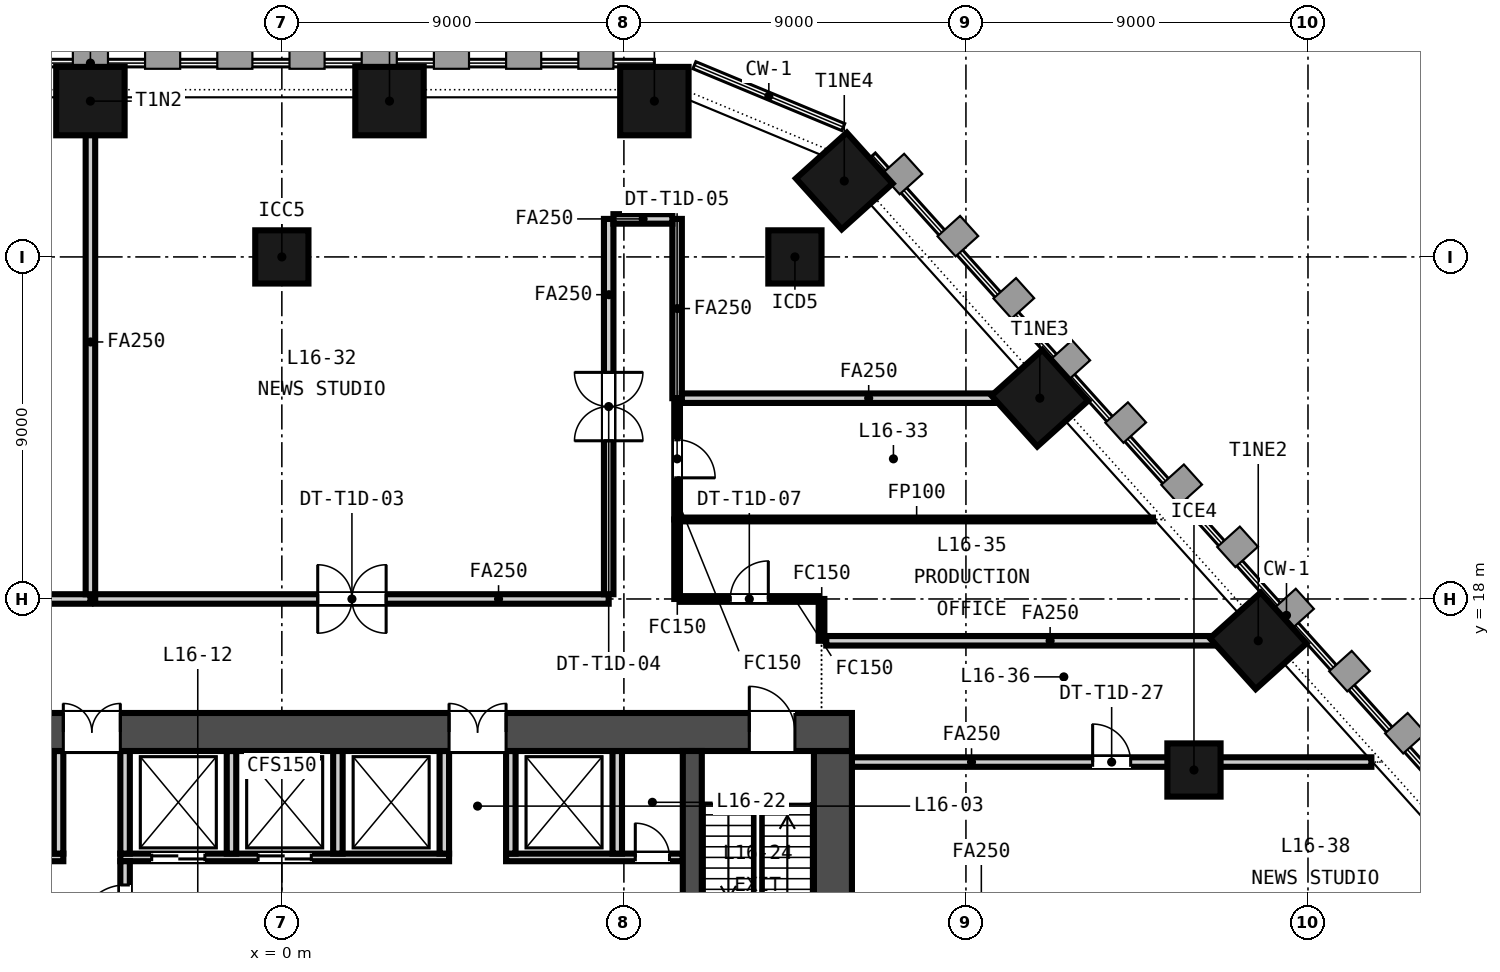
"""IFC4 building model, lengths in metres.
Left out: names, types, materials, properties, quantities, classifications, styles, units other than length and angle.
Written with IfcOpenShell. Run it as: python <this file> out.ifc"""

import sys

from ifc_helpers import new_model, si_unit, direction, frame, frame_2d, origin, origin_2d, place, context, subcontext, project, spatial, rectangle, extrude, element, fill, save


model = new_model("IFC4")
c1 = context("Model", 3, precision=1e-05, world=origin(), true_north=direction((0.0, 1.0)))
c2 = subcontext(c1, "Body", "Model", "MODEL_VIEW")
j1 = project(units=[si_unit("LENGTHUNIT", "METRE"), si_unit("PLANEANGLEUNIT", "RADIAN")], contexts=[c1])
p1 = place(None, origin())
s1 = spatial("IfcSite", under=j1, at=p1, CompositionType="ELEMENT")
p2 = place(p1, origin())
s2 = spatial("IfcBuilding", under=s1, at=p2, CompositionType="ELEMENT")
p3 = place(p2, frame((0.0, 0.0, 72.5)))
s3 = spatial("IfcBuildingStorey", under=s2, at=p3, CompositionType="ELEMENT", Elevation=72.5)
p4 = place(p3, frame((-15.0, 14.5, -0.15), z_axis=(0.0, 0.0, 1.0), x_axis=(1.0, 0.0, 0.0)))
e1 = element("IfcWall", 1, at=p4, inside=s3, PredefinedType="SOLIDWALL", context=c2, shape_type="SweptSolid", body=[
    extrude(rectangle(XDim=30.0, YDim=1.0, at=frame_2d((15.0, 0.0))), origin(), (0.0, 0.0, 1.0), 3.5),
])
p5 = place(p4, frame((9.25, 0.0, 0.15)))
e2 = element("IfcOpeningElement", 2, at=p5, cuts=e1, PredefinedType="OPENING", context=c2, shape_type="SweptSolid", body=[
    extrude(rectangle(XDim=1.5, YDim=2.1, at=frame_2d((0.75, 1.05))), frame((0.0, 0.51, 0.0), z_axis=(0.0, -1.0, 0.0), x_axis=(1.0, 0.0, 0.0)), (0.0, 0.0, 1.0), 1.02),
])
p6 = place(p4, frame((19.4, 0.0, 0.15)))
e3 = element("IfcOpeningElement", 3, at=p6, cuts=e1, PredefinedType="OPENING", context=c2, shape_type="SweptSolid", body=[
    extrude(rectangle(XDim=1.5, YDim=2.1, at=frame_2d((0.75, 1.05))), frame((0.0, 0.51, 0.0), z_axis=(0.0, -1.0, 0.0), x_axis=(1.0, 0.0, 0.0)), (0.0, 0.0, 1.0), 1.02),
])
p7 = place(p4, frame((1.5, 0.0, 0.15)))
e4 = element("IfcOpeningElement", 4, at=p7, cuts=e1, PredefinedType="OPENING", context=c2, shape_type="SweptSolid", body=[
    extrude(rectangle(XDim=1.2, YDim=2.1, at=frame_2d((0.6, 1.05))), frame((0.0, 0.51, 0.0), z_axis=(0.0, -1.0, 0.0), x_axis=(1.0, 0.0, 0.0)), (0.0, 0.0, 1.0), 1.02),
])
p8 = place(p4, frame((27.3, 0.0, 0.15)))
e5 = element("IfcOpeningElement", 5, at=p8, cuts=e1, PredefinedType="OPENING", context=c2, shape_type="SweptSolid", body=[
    extrude(rectangle(XDim=1.2, YDim=2.1, at=frame_2d((0.6, 1.05))), frame((0.0, 0.51, 0.0), z_axis=(0.0, -1.0, 0.0), x_axis=(1.0, 0.0, 0.0)), (0.0, 0.0, 1.0), 1.02),
])
p9 = place(p3, frame((14.5, 1.0, -0.15), z_axis=(0.0, 0.0, 1.0), x_axis=(0.0, 1.0, 0.0)))
e6 = element("IfcWall", 6, at=p9, inside=s3, PredefinedType="SOLIDWALL", context=c2, shape_type="SweptSolid", body=[
    extrude(rectangle(XDim=13.0, YDim=1.0, at=frame_2d((6.5, 0.0))), origin(), (0.0, 0.0, 1.0), 3.5),
])
p10 = place(p3, frame((10.8, 1.0, -0.15), z_axis=(0.0, 0.0, 1.0), x_axis=(0.0, 1.0, 0.0)))
e7 = element("IfcWall", 7, at=p10, inside=s3, PredefinedType="SOLIDWALL", context=c2, shape_type="SweptSolid", body=[
    extrude(rectangle(XDim=13.0, YDim=0.5, at=frame_2d((6.5, 0.0))), origin(), (0.0, 0.0, 1.0), 3.5),
])
for number, where, z_axis, x_axis in (
    (8, (9.802, 31.1, -0.15), (0.0, 0.0, 1.0), (-1.0, 0.0, 0.0)),
    (9, (2.832, 31.1, -0.15), (0.0, 0.0, 1.0), (-1.0, 0.0, 0.0)),
    (10, (-5.037, 31.1, -0.15), (0.0, 0.0, 1.0), (-1.0, 0.0, 0.0)),
    (11, (25.691, 16.9, -0.15), (0.0, 0.0, 1.0), (-0.669, 0.743, 0.0)),
    (12, (19.944, 23.283, -0.15), (0.0, 0.0, 1.0), (-0.669, 0.743, 0.0)),
    (13, (14.799, 28.998, -0.15), (0.0, 0.0, 1.0), (-0.669, 0.743, 0.0)),
):
    element("IfcColumn", number, at=place(p3, frame(where, z_axis=z_axis, x_axis=x_axis)), inside=s3, PredefinedType="COLUMN", context=c2, shape_type="SweptSolid", body=[
        extrude(rectangle(XDim=1.8, YDim=1.8, at=origin_2d()), origin(), (0.0, 0.0, 1.0), 3.5),
    ])
for number, where, z_axis, x_axis in (
    (14, (0.0, 27.0, -0.15), (0.0, 0.0, 1.0), (1.0, 0.0, 0.0)),
    (15, (13.5, 27.0, -0.15), (0.0, 0.0, 1.0), (1.0, 0.0, 0.0)),
    (16, (24.0, 13.5, -0.15), (0.0, 0.0, 1.0), (1.0, 0.0, 0.0)),
):
    element("IfcColumn", number, at=place(p3, frame(where, z_axis=z_axis, x_axis=x_axis)), inside=s3, PredefinedType="COLUMN", context=c2, shape_type="SweptSolid", body=[
        extrude(rectangle(XDim=1.4, YDim=1.4, at=origin_2d()), origin(), (0.0, 0.0, 1.0), 3.5),
    ])
p11 = place(p3, frame((-10.55, 11.2, 0.0), z_axis=(0.0, 0.0, 1.0), x_axis=(1.0, 0.0, 0.0)))
e17 = element("IfcWall", 17, at=p11, inside=s3, PredefinedType="PARTITIONING", context=c2, shape_type="SweptSolid", body=[
    extrude(rectangle(XDim=4.8, YDim=0.2, at=frame_2d((2.4, 0.0))), origin(), (0.0, 0.0, 1.0), 3.35),
])
p12 = place(p11, frame((0.525, 0.0, 0.0)))
e18 = element("IfcOpeningElement", 18, at=p12, cuts=e17, PredefinedType="OPENING", context=c2, shape_type="SweptSolid", body=[
    extrude(rectangle(XDim=1.1, YDim=2.1, at=frame_2d((0.55, 1.05))), frame((0.0, 0.11, 0.0), z_axis=(0.0, -1.0, 0.0), x_axis=(1.0, 0.0, 0.0)), (0.0, 0.0, 1.0), 0.22),
])
p13 = place(p11, frame((2.925, 0.0, 0.0)))
e19 = element("IfcOpeningElement", 19, at=p13, cuts=e17, PredefinedType="OPENING", context=c2, shape_type="SweptSolid", body=[
    extrude(rectangle(XDim=1.1, YDim=2.1, at=frame_2d((0.55, 1.05))), frame((0.0, 0.11, 0.0), z_axis=(0.0, -1.0, 0.0), x_axis=(1.0, 0.0, 0.0)), (0.0, 0.0, 1.0), 0.22),
])
p14 = place(p3, frame((-4.25, 11.2, 0.0), z_axis=(0.0, 0.0, 1.0), x_axis=(1.0, 0.0, 0.0)))
e20 = element("IfcWall", 20, at=p14, inside=s3, PredefinedType="PARTITIONING", context=c2, shape_type="SweptSolid", body=[
    extrude(rectangle(XDim=8.65, YDim=0.2, at=frame_2d((4.325, 0.0))), origin(), (0.0, 0.0, 1.0), 3.35),
])
p15 = place(p14, frame((0.825, 0.0, 0.0)))
e21 = element("IfcOpeningElement", 21, at=p15, cuts=e20, PredefinedType="OPENING", context=c2, shape_type="SweptSolid", body=[
    extrude(rectangle(XDim=1.4, YDim=2.1, at=frame_2d((0.7, 1.05))), frame((0.0, 0.11, 0.0), z_axis=(0.0, -1.0, 0.0), x_axis=(1.0, 0.0, 0.0)), (0.0, 0.0, 1.0), 0.22),
])
p16 = place(p14, frame((3.625, 0.0, 0.0)))
e22 = element("IfcOpeningElement", 22, at=p16, cuts=e20, PredefinedType="OPENING", context=c2, shape_type="SweptSolid", body=[
    extrude(rectangle(XDim=1.4, YDim=2.1, at=frame_2d((0.7, 1.05))), frame((0.0, 0.11, 0.0), z_axis=(0.0, -1.0, 0.0), x_axis=(1.0, 0.0, 0.0)), (0.0, 0.0, 1.0), 0.22),
])
p17 = place(p3, frame((5.9, 11.2, 0.0), z_axis=(0.0, 0.0, 1.0), x_axis=(1.0, 0.0, 0.0)))
e23 = element("IfcWall", 23, at=p17, inside=s3, PredefinedType="PARTITIONING", context=c2, shape_type="SweptSolid", body=[
    extrude(rectangle(XDim=4.65, YDim=0.2, at=frame_2d((2.325, 0.0))), origin(), (0.0, 0.0, 1.0), 3.35),
])
p18 = place(p17, frame((3.4, 0.0, 0.0)))
e24 = element("IfcOpeningElement", 24, at=p18, cuts=e23, PredefinedType="OPENING", context=c2, shape_type="SweptSolid", body=[
    extrude(rectangle(XDim=0.9, YDim=2.1, at=frame_2d((0.45, 1.05))), frame((0.0, 0.11, 0.0), z_axis=(0.0, -1.0, 0.0), x_axis=(1.0, 0.0, 0.0)), (0.0, 0.0, 1.0), 0.22),
])
p19 = place(p3, frame((-4.125, 6.15, 0.0), z_axis=(0.0, 0.0, 1.0), x_axis=(0.0, 1.0, 0.0)))
e25 = element("IfcWall", 25, at=p19, inside=s3, PredefinedType="PARTITIONING", context=c2, shape_type="SweptSolid", body=[
    extrude(rectangle(XDim=4.95, YDim=0.25, at=frame_2d((2.475, 0.0))), origin(), (0.0, 0.0, 1.0), 3.35),
])
p20 = place(p19, frame((3.125, 0.0, 0.0)))
e26 = element("IfcOpeningElement", 26, at=p20, cuts=e25, PredefinedType="OPENING", context=c2, shape_type="SweptSolid", body=[
    extrude(rectangle(XDim=1.2, YDim=2.1, at=frame_2d((0.6, 1.05))), frame((0.0, 0.135, 0.0), z_axis=(0.0, -1.0, 0.0), x_axis=(1.0, 0.0, 0.0)), (0.0, 0.0, 1.0), 0.27),
])
for number, where, z_axis, x_axis in (
    (27, (-5.875, 11.3, 0.0), (0.0, 0.0, 1.0), (0.0, 1.0, 0.0)),
    (28, (-4.125, 11.3, 0.0), (0.0, 0.0, 1.0), (0.0, 1.0, 0.0)),
    (29, (-1.325, 11.3, 0.0), (0.0, 0.0, 1.0), (0.0, 1.0, 0.0)),
    (30, (1.475, 11.3, 0.0), (0.0, 0.0, 1.0), (0.0, 1.0, 0.0)),
    (31, (4.275, 11.3, 0.0), (0.0, 0.0, 1.0), (0.0, 1.0, 0.0)),
    (32, (6.025, 11.3, 0.0), (0.0, 0.0, 1.0), (0.0, 1.0, 0.0)),
    (33, (8.825, 11.3, 0.0), (0.0, 0.0, 1.0), (0.0, 1.0, 0.0)),
):
    element("IfcWall", number, at=place(p3, frame(where, z_axis=z_axis, x_axis=x_axis)), inside=s3, PredefinedType="PARTITIONING", context=c2, shape_type="SweptSolid", body=[
        extrude(rectangle(XDim=2.7, YDim=0.25, at=frame_2d((1.35, 0.0))), origin(), (0.0, 0.0, 1.0), 3.35),
    ])
p21 = place(p3, frame((10.4, 28.0, 0.0), z_axis=(0.0, 0.0, 1.0), x_axis=(0.0, -1.0, 0.0)))
e34 = element("IfcWall", 34, at=p21, inside=s3, PredefinedType="PARTITIONING", context=c2, shape_type="SweptSolid", body=[
    extrude(rectangle(XDim=4.717, YDim=0.25, at=frame_2d((2.358, 0.0))), origin(), (0.0, 0.0, 1.0), 2.591),
])
p22 = place(p3, frame((10.4, 23.283, 0.0), z_axis=(0.0, 0.0, 1.0), x_axis=(0.0, -1.0, 0.0)))
e35 = element("IfcWall", 35, at=p22, inside=s3, PredefinedType="PARTITIONING", context=c2, shape_type="SweptSolid", body=[
    extrude(rectangle(XDim=3.191, YDim=0.15, at=frame_2d((1.595, 0.0))), origin(), (0.0, 0.0, 1.0), 2.591),
])
p23 = place(p22, frame((1.095, 0.0, 0.0)))
e36 = element("IfcOpeningElement", 36, at=p23, cuts=e35, PredefinedType="OPENING", context=c2, shape_type="SweptSolid", body=[
    extrude(rectangle(XDim=1.0, YDim=2.1, at=frame_2d((0.5, 1.05))), frame((0.0, 0.085, 0.0), z_axis=(0.0, -1.0, 0.0), x_axis=(1.0, 0.0, 0.0)), (0.0, 0.0, 1.0), 0.17),
])
p24 = place(p3, frame((10.4, 20.092, 0.0), z_axis=(0.0, 0.0, 1.0), x_axis=(0.0, -1.0, 0.0)))
e37 = element("IfcWall", 37, at=p24, inside=s3, PredefinedType="PARTITIONING", context=c2, shape_type="SweptSolid", body=[
    extrude(rectangle(XDim=2.092, YDim=0.15, at=frame_2d((1.046, 0.0))), origin(), (0.0, 0.0, 1.0), 2.591),
])
p25 = place(p3, frame((14.2, 18.0, 0.0), z_axis=(0.0, 0.0, 1.0), x_axis=(0.0, -1.0, 0.0)))
e38 = element("IfcWall", 38, at=p25, inside=s3, PredefinedType="PARTITIONING", context=c2, shape_type="SweptSolid", body=[
    extrude(rectangle(XDim=1.1, YDim=0.15, at=frame_2d((0.55, 0.0))), origin(), (0.0, 0.0, 1.0), 2.591),
])
p26 = place(p3, frame((-12.782, 18.0, 0.0), z_axis=(0.0, 0.0, 1.0), x_axis=(1.0, 0.0, 0.0)))
e39 = element("IfcWall", 39, at=p26, inside=s3, PredefinedType="PARTITIONING", context=c2, shape_type="SweptSolid", body=[
    extrude(rectangle(XDim=7.745, YDim=0.25, at=frame_2d((3.873, 0.0))), origin(), (0.0, 0.0, 1.0), 2.591),
])
p27 = place(p26, frame((2.972, 0.0, 0.0)))
e40 = element("IfcOpeningElement", 40, at=p27, cuts=e39, PredefinedType="OPENING", context=c2, shape_type="SweptSolid", body=[
    extrude(rectangle(XDim=1.8, YDim=2.1, at=frame_2d((0.9, 1.05))), frame((0.0, 0.135, 0.0), z_axis=(0.0, -1.0, 0.0), x_axis=(1.0, 0.0, 0.0)), (0.0, 0.0, 1.0), 0.27),
])
p28 = place(p3, frame((-5.037, 18.125, 0.0), z_axis=(0.0, 0.0, 1.0), x_axis=(0.0, 1.0, 0.0)))
e41 = element("IfcWall", 41, at=p28, inside=s3, PredefinedType="PARTITIONING", context=c2, shape_type="SweptSolid", body=[
    extrude(rectangle(XDim=13.275, YDim=0.25, at=frame_2d((6.637, 0.0))), origin(), (0.0, 0.0, 1.0), 2.591),
])
p29 = place(p3, frame((-4.912, 18.0, 0.0), z_axis=(0.0, 0.0, 1.0), x_axis=(1.0, 0.0, 0.0)))
e42 = element("IfcWall", 42, at=p29, inside=s3, PredefinedType="PARTITIONING", context=c2, shape_type="SweptSolid", body=[
    extrude(rectangle(XDim=13.512, YDim=0.25, at=frame_2d((6.756, 0.0))), origin(), (0.0, 0.0, 1.0), 2.591),
])
p30 = place(p29, frame((5.856, 0.0, 0.0)))
e43 = element("IfcOpeningElement", 43, at=p30, cuts=e42, PredefinedType="OPENING", context=c2, shape_type="SweptSolid", body=[
    extrude(rectangle(XDim=1.8, YDim=2.1, at=frame_2d((0.9, 1.05))), frame((0.0, 0.135, 0.0), z_axis=(0.0, -1.0, 0.0), x_axis=(1.0, 0.0, 0.0)), (0.0, 0.0, 1.0), 0.27),
])
p31 = place(p3, frame((8.6, 18.125, 0.0), z_axis=(0.0, 0.0, 1.0), x_axis=(0.0, 1.0, 0.0)))
e44 = element("IfcWall", 44, at=p31, inside=s3, PredefinedType="PARTITIONING", context=c2, shape_type="SweptSolid", body=[
    extrude(rectangle(XDim=9.875, YDim=0.25, at=frame_2d((4.938, 0.0))), origin(), (0.0, 0.0, 1.0), 2.591),
])
p32 = place(p31, frame((4.038, 0.0, 0.0)))
e45 = element("IfcOpeningElement", 45, at=p32, cuts=e44, PredefinedType="OPENING", context=c2, shape_type="SweptSolid", body=[
    extrude(rectangle(XDim=1.8, YDim=2.1, at=frame_2d((0.9, 1.05))), frame((0.0, 0.135, 0.0), z_axis=(0.0, -1.0, 0.0), x_axis=(1.0, 0.0, 0.0)), (0.0, 0.0, 1.0), 0.27),
])
p33 = place(p3, frame((8.725, 28.0, 0.0), z_axis=(0.0, 0.0, 1.0), x_axis=(1.0, 0.0, 0.0)))
e46 = element("IfcWall", 46, at=p33, inside=s3, PredefinedType="PARTITIONING", context=c2, shape_type="SweptSolid", body=[
    extrude(rectangle(XDim=1.55, YDim=0.25, at=frame_2d((0.775, 0.0))), origin(), (0.0, 0.0, 1.0), 2.591),
])
p34 = place(p3, frame((10.525, 23.283, 0.0), z_axis=(0.0, 0.0, 1.0), x_axis=(1.0, 0.0, 0.0)))
e47 = element("IfcWall", 47, at=p34, inside=s3, PredefinedType="PARTITIONING", context=c2, shape_type="SweptSolid", body=[
    extrude(rectangle(XDim=9.822, YDim=0.25, at=frame_2d((4.911, 0.0))), origin(), (0.0, 0.0, 1.0), 2.591),
])
p35 = place(p3, frame((10.475, 20.092, 0.0), z_axis=(0.0, 0.0, 1.0), x_axis=(1.0, 0.0, 0.0)))
e48 = element("IfcWall", 48, at=p35, inside=s3, PredefinedType="PARTITIONING", context=c2, shape_type="SweptSolid", body=[
    extrude(rectangle(XDim=12.446, YDim=0.1, at=frame_2d((6.223, 0.0))), origin(), (0.0, 0.0, 1.0), 2.591),
])
p36 = place(p3, frame((10.475, 18.0, 0.0), z_axis=(0.0, 0.0, 1.0), x_axis=(1.0, 0.0, 0.0)))
e49 = element("IfcWall", 49, at=p36, inside=s3, PredefinedType="PARTITIONING", context=c2, shape_type="SweptSolid", body=[
    extrude(rectangle(XDim=3.65, YDim=0.15, at=frame_2d((1.825, 0.0))), origin(), (0.0, 0.0, 1.0), 2.591),
])
p37 = place(p36, frame((1.325, 0.0, 0.0)))
e50 = element("IfcOpeningElement", 50, at=p37, cuts=e49, PredefinedType="OPENING", context=c2, shape_type="SweptSolid", body=[
    extrude(rectangle(XDim=1.0, YDim=2.1, at=frame_2d((0.5, 1.05))), frame((0.0, 0.085, 0.0), z_axis=(0.0, -1.0, 0.0), x_axis=(1.0, 0.0, 0.0)), (0.0, 0.0, 1.0), 0.17),
])
p38 = place(p3, frame((14.325, 16.9, 0.0), z_axis=(0.0, 0.0, 1.0), x_axis=(1.0, 0.0, 0.0)))
e51 = element("IfcWall", 51, at=p38, inside=s3, PredefinedType="PARTITIONING", context=c2, shape_type="SweptSolid", body=[
    extrude(rectangle(XDim=11.77, YDim=0.25, at=frame_2d((5.885, 0.0))), origin(), (0.0, 0.0, 1.0), 2.591),
])
p39 = place(p3, frame((15.0, 13.709, 0.0), z_axis=(0.0, 0.0, 1.0), x_axis=(1.0, 0.0, 0.0)))
e52 = element("IfcWall", 52, at=p39, inside=s3, PredefinedType="PARTITIONING", context=c2, shape_type="SweptSolid", body=[
    extrude(rectangle(XDim=13.668, YDim=0.25, at=frame_2d((6.834, 0.0))), origin(), (0.0, 0.0, 1.0), 2.591),
])
p40 = place(p39, frame((6.334, 0.0, 0.0)))
e53 = element("IfcOpeningElement", 53, at=p40, cuts=e52, PredefinedType="OPENING", context=c2, shape_type="SweptSolid", body=[
    extrude(rectangle(XDim=1.0, YDim=2.1, at=frame_2d((0.5, 1.05))), frame((0.0, 0.135, 0.0), z_axis=(0.0, -1.0, 0.0), x_axis=(1.0, 0.0, 0.0)), (0.0, 0.0, 1.0), 0.27),
])
p41 = place(p20, origin())
e54 = element("IfcDoor", 54, at=p41, inside=s3, OperationType="SINGLE_SWING_LEFT", PredefinedType="DOOR", context=c2, shape_type="SweptSolid", body=[
    extrude(rectangle(XDim=1.2, YDim=2.1, at=frame_2d((0.6, 1.05))), frame((0.0, 0.025, 0.0), z_axis=(0.0, -1.0, 0.0), x_axis=(1.0, 0.0, 0.0)), (0.0, 0.0, 1.0), 0.05),
])
fill(e26, e54)
p42 = place(p15, origin())
e55 = element("IfcDoor", 55, at=p42, inside=s3, OperationType="DOUBLE_DOOR_SLIDING", PredefinedType="DOOR", context=c2, shape_type="SweptSolid", body=[
    extrude(rectangle(XDim=1.4, YDim=2.1, at=frame_2d((0.7, 1.05))), frame((0.0, 0.025, 0.0), z_axis=(0.0, -1.0, 0.0), x_axis=(1.0, 0.0, 0.0)), (0.0, 0.0, 1.0), 0.05),
])
fill(e21, e55)
p43 = place(p16, origin())
e56 = element("IfcDoor", 56, at=p43, inside=s3, OperationType="DOUBLE_DOOR_SLIDING", PredefinedType="DOOR", context=c2, shape_type="SweptSolid", body=[
    extrude(rectangle(XDim=1.4, YDim=2.1, at=frame_2d((0.7, 1.05))), frame((0.0, 0.025, 0.0), z_axis=(0.0, -1.0, 0.0), x_axis=(1.0, 0.0, 0.0)), (0.0, 0.0, 1.0), 0.05),
])
fill(e22, e56)
p44 = place(p18, origin())
e57 = element("IfcDoor", 57, at=p44, inside=s3, OperationType="SINGLE_SWING_LEFT", PredefinedType="DOOR", context=c2, shape_type="SweptSolid", body=[
    extrude(rectangle(XDim=0.9, YDim=2.1, at=frame_2d((0.45, 1.05))), frame((0.0, 0.025, 0.0), z_axis=(0.0, -1.0, 0.0), x_axis=(1.0, 0.0, 0.0)), (0.0, 0.0, 1.0), 0.05),
])
fill(e24, e57)
p45 = place(p5, origin())
e58 = element("IfcDoor", 58, at=p45, inside=s3, OperationType="DOUBLE_DOOR_SINGLE_SWING", PredefinedType="DOOR", context=c2, shape_type="SweptSolid", body=[
    extrude(rectangle(XDim=1.5, YDim=2.1, at=frame_2d((0.75, 1.05))), frame((0.0, 0.025, 0.0), z_axis=(0.0, -1.0, 0.0), x_axis=(1.0, 0.0, 0.0)), (0.0, 0.0, 1.0), 0.05),
])
fill(e2, e58)
p46 = place(p6, origin())
e59 = element("IfcDoor", 59, at=p46, inside=s3, OperationType="DOUBLE_DOOR_SINGLE_SWING", PredefinedType="DOOR", context=c2, shape_type="SweptSolid", body=[
    extrude(rectangle(XDim=1.5, YDim=2.1, at=frame_2d((0.75, 1.05))), frame((0.0, 0.025, 0.0), z_axis=(0.0, -1.0, 0.0), x_axis=(1.0, 0.0, 0.0)), (0.0, 0.0, 1.0), 0.05),
])
fill(e3, e59)
p47 = place(p8, origin())
e60 = element("IfcDoor", 60, at=p47, inside=s3, OperationType="SINGLE_SWING_LEFT", PredefinedType="DOOR", context=c2, shape_type="SweptSolid", body=[
    extrude(rectangle(XDim=1.2, YDim=2.1, at=frame_2d((0.6, 1.05))), frame((0.0, 0.025, 0.0), z_axis=(0.0, -1.0, 0.0), x_axis=(1.0, 0.0, 0.0)), (0.0, 0.0, 1.0), 0.05),
])
fill(e5, e60)
p48 = place(p30, origin())
e61 = element("IfcDoor", 61, at=p48, inside=s3, OperationType="DOUBLE_DOOR_DOUBLE_SWING", PredefinedType="DOOR", context=c2, shape_type="SweptSolid", body=[
    extrude(rectangle(XDim=1.8, YDim=2.1, at=frame_2d((0.9, 1.05))), frame((0.0, 0.025, 0.0), z_axis=(0.0, -1.0, 0.0), x_axis=(1.0, 0.0, 0.0)), (0.0, 0.0, 1.0), 0.05),
])
fill(e43, e61)
p49 = place(p32, origin())
e62 = element("IfcDoor", 62, at=p49, inside=s3, OperationType="DOUBLE_DOOR_DOUBLE_SWING", PredefinedType="DOOR", context=c2, shape_type="SweptSolid", body=[
    extrude(rectangle(XDim=1.8, YDim=2.1, at=frame_2d((0.9, 1.05))), frame((0.0, 0.025, 0.0), z_axis=(0.0, -1.0, 0.0), x_axis=(1.0, 0.0, 0.0)), (0.0, 0.0, 1.0), 0.05),
])
fill(e45, e62)
p50 = place(p23, origin())
e63 = element("IfcDoor", 63, at=p50, inside=s3, OperationType="SINGLE_SWING_RIGHT", PredefinedType="DOOR", context=c2, shape_type="SweptSolid", body=[
    extrude(rectangle(XDim=1.0, YDim=2.1, at=frame_2d((0.5, 1.05))), frame((0.0, 0.025, 0.0), z_axis=(0.0, -1.0, 0.0), x_axis=(1.0, 0.0, 0.0)), (0.0, 0.0, 1.0), 0.05),
])
fill(e36, e63)
p51 = place(p37, origin())
e64 = element("IfcDoor", 64, at=p51, inside=s3, OperationType="SINGLE_SWING_RIGHT", PredefinedType="DOOR", context=c2, shape_type="SweptSolid", body=[
    extrude(rectangle(XDim=1.0, YDim=2.1, at=frame_2d((0.5, 1.05))), frame((0.0, 0.025, 0.0), z_axis=(0.0, -1.0, 0.0), x_axis=(1.0, 0.0, 0.0)), (0.0, 0.0, 1.0), 0.05),
])
fill(e50, e64)
p52 = place(p40, origin())
e65 = element("IfcDoor", 65, at=p52, inside=s3, OperationType="SINGLE_SWING_LEFT", PredefinedType="DOOR", context=c2, shape_type="SweptSolid", body=[
    extrude(rectangle(XDim=1.0, YDim=2.1, at=frame_2d((0.5, 1.05))), frame((0.0, 0.025, 0.0), z_axis=(0.0, -1.0, 0.0), x_axis=(1.0, 0.0, 0.0)), (0.0, 0.0, 1.0), 0.05),
])
fill(e53, e65)
save(model, sys.argv[1])
